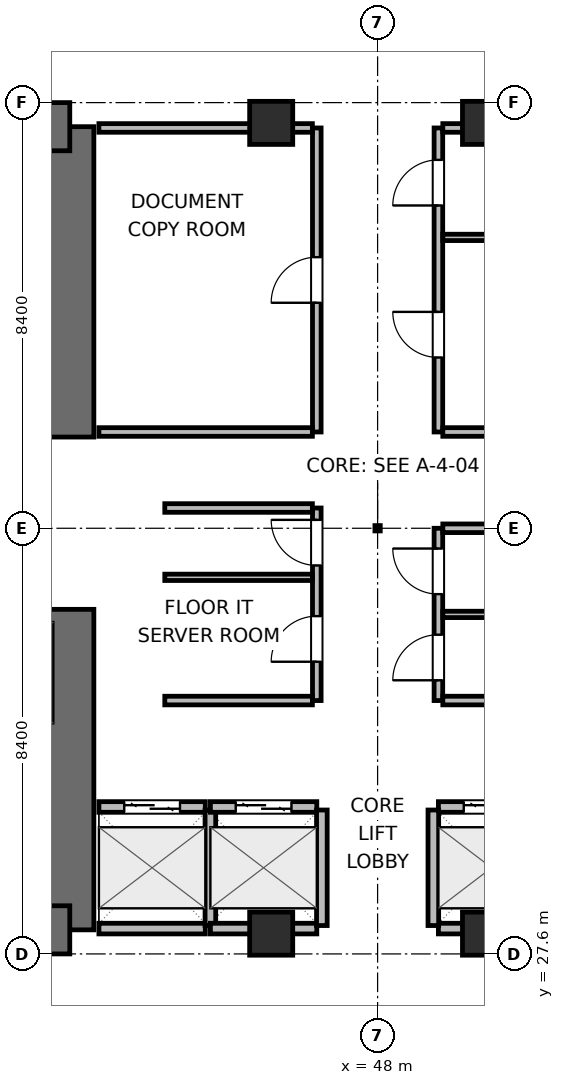
"""IFC4 building model, lengths in metres.
Left out: names, types, materials, properties, quantities, classifications, styles, units other than length and angle.
Written with IfcOpenShell. Run it as: python <this file> out.ifc"""

import sys

from ifc_helpers import new_model, si_unit, direction, frame, frame_2d, origin, origin_2d, place, context, subcontext, project, spatial, rectangle, extrude, element, fill, save


model = new_model("IFC4")
c1 = context("Model", 3, precision=1e-05, world=origin(), true_north=direction((0.0, 1.0)))
c2 = subcontext(c1, "Body", "Model", "MODEL_VIEW")
j1 = project(units=[si_unit("LENGTHUNIT", "METRE"), si_unit("PLANEANGLEUNIT", "RADIAN")], contexts=[c1])
p1 = place(None, origin())
s1 = spatial("IfcSite", under=j1, at=p1, CompositionType="ELEMENT")
p2 = place(p1, origin())
s2 = spatial("IfcBuilding", under=s1, at=p2, CompositionType="ELEMENT")
p3 = place(p2, frame((0.0, 0.0, 76.8)))
s3 = spatial("IfcBuildingStorey", under=s2, at=p3, CompositionType="ELEMENT", Elevation=76.8)
p4 = place(p3, frame((41.925, 28.075, 0.0), z_axis=(0.0, 0.0, 1.0), x_axis=(0.0, 1.0, 0.0)))
e1 = element("IfcWall", 1, at=p4, inside=s3, PredefinedType="SHEAR", context=c2, shape_type="SweptSolid", body=[
    extrude(rectangle(XDim=6.325, YDim=0.95, at=frame_2d((3.163, 0.0))), origin(), (0.0, 0.0, 1.0), 3.9),
])
p5 = place(p3, frame((41.925, 37.8, 0.0), z_axis=(0.0, 0.0, 1.0), x_axis=(0.0, 1.0, 0.0)))
e2 = element("IfcWall", 2, at=p5, inside=s3, PredefinedType="SHEAR", context=c2, shape_type="SweptSolid", body=[
    extrude(rectangle(XDim=6.125, YDim=0.95, at=frame_2d((3.062, 0.0))), origin(), (0.0, 0.0, 1.0), 3.9),
])
p6 = place(p3, frame((32.875, 28.075, 0.0), z_axis=(0.0, 0.0, 1.0), x_axis=(1.0, 0.0, 0.0)))
e3 = element("IfcWall", 3, at=p6, inside=s3, PredefinedType="SHEAR", context=c2, shape_type="SweptSolid", body=[
    extrude(rectangle(XDim=9.05, YDim=0.95, at=frame_2d((4.525, 0.0))), origin(), (0.0, 0.0, 1.0), 3.9),
])
p7 = place(p6, frame((4.975, 0.0, 0.0)))
e4 = element("IfcOpeningElement", 4, at=p7, cuts=e3, PredefinedType="OPENING", context=c2, shape_type="SweptSolid", body=[
    extrude(rectangle(XDim=1.05, YDim=2.04, at=frame_2d((0.525, 1.02))), frame((0.0, 0.485, 0.0), z_axis=(0.0, -1.0, 0.0), x_axis=(1.0, 0.0, 0.0)), (0.0, 0.0, 1.0), 0.97),
])
p8 = place(p3, frame((32.875, 43.925, 0.0), z_axis=(0.0, 0.0, 1.0), x_axis=(1.0, 0.0, 0.0)))
e5 = element("IfcWall", 5, at=p8, inside=s3, PredefinedType="SHEAR", context=c2, shape_type="SweptSolid", body=[
    extrude(rectangle(XDim=9.05, YDim=0.95, at=frame_2d((4.525, 0.0))), origin(), (0.0, 0.0, 1.0), 3.9),
])
p9 = place(p8, frame((0.975, 0.0, 0.0)))
e6 = element("IfcOpeningElement", 6, at=p9, cuts=e5, PredefinedType="OPENING", context=c2, shape_type="SweptSolid", body=[
    extrude(rectangle(XDim=0.95, YDim=2.04, at=frame_2d((0.475, 1.02))), frame((0.0, 0.485, 0.0), z_axis=(0.0, -1.0, 0.0), x_axis=(1.0, 0.0, 0.0)), (0.0, 0.0, 1.0), 0.97),
])
p10 = place(p8, frame((4.225, 0.0, 0.0)))
e7 = element("IfcOpeningElement", 7, at=p10, cuts=e5, PredefinedType="OPENING", context=c2, shape_type="SweptSolid", body=[
    extrude(rectangle(XDim=0.9, YDim=2.02, at=frame_2d((0.45, 1.01))), frame((0.0, 0.485, 0.0), z_axis=(0.0, -1.0, 0.0), x_axis=(1.0, 0.0, 0.0)), (0.0, 0.0, 1.0), 0.97),
])
p11 = place(p8, frame((7.125, 0.0, 0.0)))
e8 = element("IfcOpeningElement", 8, at=p11, cuts=e5, PredefinedType="OPENING", context=c2, shape_type="SweptSolid", body=[
    extrude(rectangle(XDim=0.9, YDim=2.02, at=frame_2d((0.45, 1.01))), frame((0.0, 0.485, 0.0), z_axis=(0.0, -1.0, 0.0), x_axis=(1.0, 0.0, 0.0)), (0.0, 0.0, 1.0), 0.97),
])
for number, where, z_axis, x_axis in (
    (9, (45.9, 28.0, 0.0), (0.0, 0.0, 1.0), (1.0, 0.0, 0.0)),
    (10, (50.1, 28.0, 0.0), (0.0, 0.0, 1.0), (1.0, 0.0, 0.0)),
    (11, (45.9, 44.0, 0.0), (0.0, 0.0, 1.0), (1.0, 0.0, 0.0)),
    (12, (50.1, 44.0, 0.0), (0.0, 0.0, 1.0), (1.0, 0.0, 0.0)),
):
    element("IfcColumn", number, at=place(p3, frame(where, z_axis=z_axis, x_axis=x_axis)), inside=s3, PredefinedType="COLUMN", context=c2, shape_type="SweptSolid", body=[
        extrude(rectangle(XDim=0.85, YDim=0.85, at=origin_2d()), origin(), (0.0, 0.0, 1.0), 3.9),
    ])
p12 = place(p3, frame((42.5, 30.5, 0.0), z_axis=(0.0, 0.0, 1.0), x_axis=(1.0, 0.0, 0.0)))
e13 = element("IfcWall", 13, at=p12, inside=s3, PredefinedType="PARTITIONING", context=c2, shape_type="SweptSolid", body=[
    extrude(rectangle(XDim=2.1, YDim=0.21, at=frame_2d((1.05, 0.0))), origin(), (0.0, 0.0, 1.0), 3.6),
])
p13 = place(p12, frame((0.5, 0.0, 0.0)))
e14 = element("IfcOpeningElement", 14, at=p13, cuts=e13, PredefinedType="OPENING", context=c2, shape_type="SweptSolid", body=[
    extrude(rectangle(XDim=1.1, YDim=2.04, at=frame_2d((0.55, 1.02))), frame((0.0, 0.115, 0.0), z_axis=(0.0, -1.0, 0.0), x_axis=(1.0, 0.0, 0.0)), (0.0, 0.0, 1.0), 0.23),
])
p14 = place(p3, frame((42.5, 28.1, 0.0), z_axis=(0.0, 0.0, 1.0), x_axis=(1.0, 0.0, 0.0)))
e15 = element("IfcWall", 15, at=p14, inside=s3, PredefinedType="PARTITIONING", context=c2, shape_type="SweptSolid", body=[
    extrude(rectangle(XDim=2.1, YDim=0.21, at=frame_2d((1.05, 0.0))), origin(), (0.0, 0.0, 1.0), 2.485),
])
p15 = place(p3, frame((44.7, 28.16, 0.0), z_axis=(0.0, 0.0, 1.0), x_axis=(0.0, 1.0, 0.0)))
e16 = element("IfcWall", 16, at=p15, inside=s3, PredefinedType="PARTITIONING", context=c2, shape_type="SweptSolid", body=[
    extrude(rectangle(XDim=2.28, YDim=0.21, at=frame_2d((1.14, 0.0))), origin(), (0.0, 0.0, 1.0), 3.6),
])
p16 = place(p3, frame((44.7, 30.5, 0.0), z_axis=(0.0, 0.0, 1.0), x_axis=(1.0, 0.0, 0.0)))
e17 = element("IfcWall", 17, at=p16, inside=s3, PredefinedType="PARTITIONING", context=c2, shape_type="SweptSolid", body=[
    extrude(rectangle(XDim=2.1, YDim=0.21, at=frame_2d((1.05, 0.0))), origin(), (0.0, 0.0, 1.0), 3.6),
])
p17 = place(p16, frame((0.5, 0.0, 0.0)))
e18 = element("IfcOpeningElement", 18, at=p17, cuts=e17, PredefinedType="OPENING", context=c2, shape_type="SweptSolid", body=[
    extrude(rectangle(XDim=1.1, YDim=2.04, at=frame_2d((0.55, 1.02))), frame((0.0, 0.115, 0.0), z_axis=(0.0, -1.0, 0.0), x_axis=(1.0, 0.0, 0.0)), (0.0, 0.0, 1.0), 0.23),
])
p18 = place(p3, frame((44.7, 28.1, 0.0), z_axis=(0.0, 0.0, 1.0), x_axis=(1.0, 0.0, 0.0)))
e19 = element("IfcWall", 19, at=p18, inside=s3, PredefinedType="PARTITIONING", context=c2, shape_type="SweptSolid", body=[
    extrude(rectangle(XDim=2.1, YDim=0.21, at=frame_2d((1.05, 0.0))), origin(), (0.0, 0.0, 1.0), 2.485),
])
p19 = place(p3, frame((46.9, 28.16, 0.0), z_axis=(0.0, 0.0, 1.0), x_axis=(0.0, 1.0, 0.0)))
e20 = element("IfcWall", 20, at=p19, inside=s3, PredefinedType="PARTITIONING", context=c2, shape_type="SweptSolid", body=[
    extrude(rectangle(XDim=2.28, YDim=0.21, at=frame_2d((1.14, 0.0))), origin(), (0.0, 0.0, 1.0), 3.6),
])
p20 = place(p3, frame((49.2, 30.5, 0.0), z_axis=(0.0, 0.0, 1.0), x_axis=(1.0, 0.0, 0.0)))
e21 = element("IfcWall", 21, at=p20, inside=s3, PredefinedType="PARTITIONING", context=c2, shape_type="SweptSolid", body=[
    extrude(rectangle(XDim=2.1, YDim=0.21, at=frame_2d((1.05, 0.0))), origin(), (0.0, 0.0, 1.0), 3.6),
])
p21 = place(p20, frame((0.5, 0.0, 0.0)))
e22 = element("IfcOpeningElement", 22, at=p21, cuts=e21, PredefinedType="OPENING", context=c2, shape_type="SweptSolid", body=[
    extrude(rectangle(XDim=1.1, YDim=2.04, at=frame_2d((0.55, 1.02))), frame((0.0, 0.115, 0.0), z_axis=(0.0, -1.0, 0.0), x_axis=(1.0, 0.0, 0.0)), (0.0, 0.0, 1.0), 0.23),
])
p22 = place(p3, frame((49.2, 28.1, 0.0), z_axis=(0.0, 0.0, 1.0), x_axis=(1.0, 0.0, 0.0)))
e23 = element("IfcWall", 23, at=p22, inside=s3, PredefinedType="PARTITIONING", context=c2, shape_type="SweptSolid", body=[
    extrude(rectangle(XDim=2.1, YDim=0.21, at=frame_2d((1.05, 0.0))), origin(), (0.0, 0.0, 1.0), 2.485),
])
p23 = place(p3, frame((49.1, 28.16, 0.0), z_axis=(0.0, 0.0, 1.0), x_axis=(0.0, 1.0, 0.0)))
e24 = element("IfcWall", 24, at=p23, inside=s3, PredefinedType="PARTITIONING", context=c2, shape_type="SweptSolid", body=[
    extrude(rectangle(XDim=2.28, YDim=0.21, at=frame_2d((1.14, 0.0))), origin(), (0.0, 0.0, 1.0), 3.6),
])
p24 = place(p3, frame((46.8, 32.6, 0.0), z_axis=(0.0, 0.0, 1.0), x_axis=(0.0, 1.0, 0.0)))
e25 = element("IfcWall", 25, at=p24, inside=s3, PredefinedType="PARTITIONING", context=c2, shape_type="SweptSolid", body=[
    extrude(rectangle(XDim=3.8, YDim=0.17, at=frame_2d((1.9, 0.0))), origin(), (0.0, 0.0, 1.0), 3.6),
])
p25 = place(p24, frame((0.766, 0.0, 0.0)))
e26 = element("IfcOpeningElement", 26, at=p25, cuts=e25, PredefinedType="OPENING", context=c2, shape_type="SweptSolid", body=[
    extrude(rectangle(XDim=0.9, YDim=2.02, at=frame_2d((0.45, 1.01))), frame((0.0, 0.095, 0.0), z_axis=(0.0, -1.0, 0.0), x_axis=(1.0, 0.0, 0.0)), (0.0, 0.0, 1.0), 0.19),
])
p26 = place(p24, frame((2.666, 0.0, 0.0)))
e27 = element("IfcOpeningElement", 27, at=p26, cuts=e25, PredefinedType="OPENING", context=c2, shape_type="SweptSolid", body=[
    extrude(rectangle(XDim=0.9, YDim=2.02, at=frame_2d((0.45, 1.01))), frame((0.0, 0.095, 0.0), z_axis=(0.0, -1.0, 0.0), x_axis=(1.0, 0.0, 0.0)), (0.0, 0.0, 1.0), 0.19),
])
for number, where, z_axis, x_axis in (
    (28, (43.8, 32.6, 0.0), (0.0, 0.0, 1.0), (1.0, 0.0, 0.0)),
    (29, (43.8, 36.4, 0.0), (0.0, 0.0, 1.0), (1.0, 0.0, 0.0)),
):
    element("IfcWall", number, at=place(p3, frame(where, z_axis=z_axis, x_axis=x_axis)), inside=s3, PredefinedType="PARTITIONING", context=c2, shape_type="SweptSolid", body=[
        extrude(rectangle(XDim=2.913, YDim=0.17, at=frame_2d((1.457, 0.0))), origin(), (0.0, 0.0, 1.0), 3.6),
    ])
p27 = place(p3, frame((43.8, 35.032, 0.0), z_axis=(0.0, 0.0, 1.0), x_axis=(1.0, 0.0, 0.0)))
e30 = element("IfcWall", 30, at=p27, inside=s3, PredefinedType="PARTITIONING", context=c2, shape_type="SweptSolid", body=[
    extrude(rectangle(XDim=2.913, YDim=0.125, at=frame_2d((1.457, 0.0))), origin(), (0.0, 0.0, 1.0), 3.6),
])
p28 = place(p3, frame((49.2, 32.6, 0.0), z_axis=(0.0, 0.0, 1.0), x_axis=(0.0, 1.0, 0.0)))
e31 = element("IfcWall", 31, at=p28, inside=s3, PredefinedType="PARTITIONING", context=c2, shape_type="SweptSolid", body=[
    extrude(rectangle(XDim=3.4, YDim=0.17, at=frame_2d((1.7, 0.0))), origin(), (0.0, 0.0, 1.0), 3.6),
])
p29 = place(p28, frame((0.4, 0.0, 0.0)))
e32 = element("IfcOpeningElement", 32, at=p29, cuts=e31, PredefinedType="OPENING", context=c2, shape_type="SweptSolid", body=[
    extrude(rectangle(XDim=0.9, YDim=2.02, at=frame_2d((0.45, 1.01))), frame((0.0, 0.095, 0.0), z_axis=(0.0, -1.0, 0.0), x_axis=(1.0, 0.0, 0.0)), (0.0, 0.0, 1.0), 0.19),
])
p30 = place(p28, frame((2.1, 0.0, 0.0)))
e33 = element("IfcOpeningElement", 33, at=p30, cuts=e31, PredefinedType="OPENING", context=c2, shape_type="SweptSolid", body=[
    extrude(rectangle(XDim=0.9, YDim=2.02, at=frame_2d((0.45, 1.01))), frame((0.0, 0.095, 0.0), z_axis=(0.0, -1.0, 0.0), x_axis=(1.0, 0.0, 0.0)), (0.0, 0.0, 1.0), 0.19),
])
for number, where, z_axis, x_axis in (
    (34, (49.287, 32.6, 0.0), (0.0, 0.0, 1.0), (1.0, 0.0, 0.0)),
    (35, (49.287, 36.0, 0.0), (0.0, 0.0, 1.0), (1.0, 0.0, 0.0)),
):
    element("IfcWall", number, at=place(p3, frame(where, z_axis=z_axis, x_axis=x_axis)), inside=s3, PredefinedType="PARTITIONING", context=c2, shape_type="SweptSolid", body=[
        extrude(rectangle(XDim=2.913, YDim=0.17, at=frame_2d((1.457, 0.0))), origin(), (0.0, 0.0, 1.0), 3.6),
    ])
p31 = place(p3, frame((49.287, 34.3, 0.0), z_axis=(0.0, 0.0, 1.0), x_axis=(1.0, 0.0, 0.0)))
e36 = element("IfcWall", 36, at=p31, inside=s3, PredefinedType="PARTITIONING", context=c2, shape_type="SweptSolid", body=[
    extrude(rectangle(XDim=2.913, YDim=0.125, at=frame_2d((1.457, 0.0))), origin(), (0.0, 0.0, 1.0), 3.6),
])
p32 = place(p3, frame((46.8, 37.9, 0.0), z_axis=(0.0, 0.0, 1.0), x_axis=(0.0, 1.0, 0.0)))
e37 = element("IfcWall", 37, at=p32, inside=s3, PredefinedType="PARTITIONING", context=c2, shape_type="SweptSolid", body=[
    extrude(rectangle(XDim=6.0, YDim=0.17, at=frame_2d((3.0, 0.0))), origin(), (0.0, 0.0, 1.0), 3.6),
])
p33 = place(p32, frame((2.55, 0.0, 0.0)))
e38 = element("IfcOpeningElement", 38, at=p33, cuts=e37, PredefinedType="OPENING", context=c2, shape_type="SweptSolid", body=[
    extrude(rectangle(XDim=0.9, YDim=2.02, at=frame_2d((0.45, 1.01))), frame((0.0, 0.095, 0.0), z_axis=(0.0, -1.0, 0.0), x_axis=(1.0, 0.0, 0.0)), (0.0, 0.0, 1.0), 0.19),
])
p34 = place(p3, frame((42.5, 37.9, 0.0), z_axis=(0.0, 0.0, 1.0), x_axis=(1.0, 0.0, 0.0)))
e39 = element("IfcWall", 39, at=p34, inside=s3, PredefinedType="PARTITIONING", context=c2, shape_type="SweptSolid", body=[
    extrude(rectangle(XDim=4.213, YDim=0.17, at=frame_2d((2.106, 0.0))), origin(), (0.0, 0.0, 1.0), 3.6),
])
p35 = place(p3, frame((42.5, 43.9, 0.0), z_axis=(0.0, 0.0, 1.0), x_axis=(1.0, 0.0, 0.0)))
e40 = element("IfcWall", 40, at=p35, inside=s3, PredefinedType="PARTITIONING", context=c2, shape_type="SweptSolid", body=[
    extrude(rectangle(XDim=4.213, YDim=0.17, at=frame_2d((2.106, 0.0))), origin(), (0.0, 0.0, 1.0), 2.485),
])
p36 = place(p3, frame((49.2, 37.9, 0.0), z_axis=(0.0, 0.0, 1.0), x_axis=(0.0, 1.0, 0.0)))
e41 = element("IfcWall", 41, at=p36, inside=s3, PredefinedType="PARTITIONING", context=c2, shape_type="SweptSolid", body=[
    extrude(rectangle(XDim=6.0, YDim=0.17, at=frame_2d((3.0, 0.0))), origin(), (0.0, 0.0, 1.0), 3.6),
])
p37 = place(p36, frame((1.47, 0.0, 0.0)))
e42 = element("IfcOpeningElement", 42, at=p37, cuts=e41, PredefinedType="OPENING", context=c2, shape_type="SweptSolid", body=[
    extrude(rectangle(XDim=0.9, YDim=2.02, at=frame_2d((0.45, 1.01))), frame((0.0, 0.095, 0.0), z_axis=(0.0, -1.0, 0.0), x_axis=(1.0, 0.0, 0.0)), (0.0, 0.0, 1.0), 0.19),
])
p38 = place(p36, frame((4.47, 0.0, 0.0)))
e43 = element("IfcOpeningElement", 43, at=p38, cuts=e41, PredefinedType="OPENING", context=c2, shape_type="SweptSolid", body=[
    extrude(rectangle(XDim=0.9, YDim=2.02, at=frame_2d((0.45, 1.01))), frame((0.0, 0.095, 0.0), z_axis=(0.0, -1.0, 0.0), x_axis=(1.0, 0.0, 0.0)), (0.0, 0.0, 1.0), 0.19),
])
p39 = place(p3, frame((49.287, 37.9, 0.0), z_axis=(0.0, 0.0, 1.0), x_axis=(1.0, 0.0, 0.0)))
e44 = element("IfcWall", 44, at=p39, inside=s3, PredefinedType="PARTITIONING", context=c2, shape_type="SweptSolid", body=[
    extrude(rectangle(XDim=4.113, YDim=0.17, at=frame_2d((2.056, 0.0))), origin(), (0.0, 0.0, 1.0), 3.6),
])
p40 = place(p3, frame((49.287, 43.9, 0.0), z_axis=(0.0, 0.0, 1.0), x_axis=(1.0, 0.0, 0.0)))
e45 = element("IfcWall", 45, at=p40, inside=s3, PredefinedType="PARTITIONING", context=c2, shape_type="SweptSolid", body=[
    extrude(rectangle(XDim=4.113, YDim=0.17, at=frame_2d((2.056, 0.0))), origin(), (0.0, 0.0, 1.0), 2.485),
])
p41 = place(p3, frame((49.287, 41.74, 0.0), z_axis=(0.0, 0.0, 1.0), x_axis=(1.0, 0.0, 0.0)))
e46 = element("IfcWall", 46, at=p41, inside=s3, PredefinedType="PARTITIONING", context=c2, shape_type="SweptSolid", body=[
    extrude(rectangle(XDim=4.113, YDim=0.125, at=frame_2d((2.056, 0.0))), origin(), (0.0, 0.0, 1.0), 3.6),
])
p42 = place(p13, origin())
e47 = element("IfcDoor", 47, at=p42, inside=s3, OperationType="DOUBLE_DOOR_SLIDING", PredefinedType="DOOR", context=c2, shape_type="SweptSolid", body=[
    extrude(rectangle(XDim=1.1, YDim=2.04, at=frame_2d((0.55, 1.02))), frame((0.0, 0.025, 0.0), z_axis=(0.0, -1.0, 0.0), x_axis=(1.0, 0.0, 0.0)), (0.0, 0.0, 1.0), 0.05),
])
fill(e14, e47)
p43 = place(p17, origin())
e48 = element("IfcDoor", 48, at=p43, inside=s3, OperationType="DOUBLE_DOOR_SLIDING", PredefinedType="DOOR", context=c2, shape_type="SweptSolid", body=[
    extrude(rectangle(XDim=1.1, YDim=2.04, at=frame_2d((0.55, 1.02))), frame((0.0, 0.025, 0.0), z_axis=(0.0, -1.0, 0.0), x_axis=(1.0, 0.0, 0.0)), (0.0, 0.0, 1.0), 0.05),
])
fill(e18, e48)
p44 = place(p21, origin())
e49 = element("IfcDoor", 49, at=p44, inside=s3, OperationType="DOUBLE_DOOR_SLIDING", PredefinedType="DOOR", context=c2, shape_type="SweptSolid", body=[
    extrude(rectangle(XDim=1.1, YDim=2.04, at=frame_2d((0.55, 1.02))), frame((0.0, 0.025, 0.0), z_axis=(0.0, -1.0, 0.0), x_axis=(1.0, 0.0, 0.0)), (0.0, 0.0, 1.0), 0.05),
])
fill(e22, e49)
p45 = place(p25, origin())
e50 = element("IfcDoor", 50, at=p45, inside=s3, OperationType="SINGLE_SWING_LEFT", PredefinedType="DOOR", context=c2, shape_type="SweptSolid", body=[
    extrude(rectangle(XDim=0.9, YDim=2.02, at=frame_2d((0.45, 1.01))), frame((0.0, 0.025, 0.0), z_axis=(0.0, -1.0, 0.0), x_axis=(1.0, 0.0, 0.0)), (0.0, 0.0, 1.0), 0.05),
])
fill(e26, e50)
p46 = place(p26, origin())
e51 = element("IfcDoor", 51, at=p46, inside=s3, OperationType="SINGLE_SWING_RIGHT", PredefinedType="DOOR", context=c2, shape_type="SweptSolid", body=[
    extrude(rectangle(XDim=0.9, YDim=2.02, at=frame_2d((0.45, 1.01))), frame((0.0, 0.025, 0.0), z_axis=(0.0, -1.0, 0.0), x_axis=(1.0, 0.0, 0.0)), (0.0, 0.0, 1.0), 0.05),
])
fill(e27, e51)
p47 = place(p29, origin())
e52 = element("IfcDoor", 52, at=p47, inside=s3, OperationType="SINGLE_SWING_LEFT", PredefinedType="DOOR", context=c2, shape_type="SweptSolid", body=[
    extrude(rectangle(XDim=0.9, YDim=2.02, at=frame_2d((0.45, 1.01))), frame((0.0, 0.025, 0.0), z_axis=(0.0, -1.0, 0.0), x_axis=(1.0, 0.0, 0.0)), (0.0, 0.0, 1.0), 0.05),
])
fill(e32, e52)
p48 = place(p30, origin())
e53 = element("IfcDoor", 53, at=p48, inside=s3, OperationType="SINGLE_SWING_RIGHT", PredefinedType="DOOR", context=c2, shape_type="SweptSolid", body=[
    extrude(rectangle(XDim=0.9, YDim=2.02, at=frame_2d((0.45, 1.01))), frame((0.0, 0.025, 0.0), z_axis=(0.0, -1.0, 0.0), x_axis=(1.0, 0.0, 0.0)), (0.0, 0.0, 1.0), 0.05),
])
fill(e33, e53)
p49 = place(p33, origin())
e54 = element("IfcDoor", 54, at=p49, inside=s3, OperationType="SINGLE_SWING_LEFT", PredefinedType="DOOR", context=c2, shape_type="SweptSolid", body=[
    extrude(rectangle(XDim=0.9, YDim=2.02, at=frame_2d((0.45, 1.01))), frame((0.0, 0.025, 0.0), z_axis=(0.0, -1.0, 0.0), x_axis=(1.0, 0.0, 0.0)), (0.0, 0.0, 1.0), 0.05),
])
fill(e38, e54)
p50 = place(p37, origin())
e55 = element("IfcDoor", 55, at=p50, inside=s3, OperationType="SINGLE_SWING_RIGHT", PredefinedType="DOOR", context=c2, shape_type="SweptSolid", body=[
    extrude(rectangle(XDim=0.9, YDim=2.02, at=frame_2d((0.45, 1.01))), frame((0.0, 0.025, 0.0), z_axis=(0.0, -1.0, 0.0), x_axis=(1.0, 0.0, 0.0)), (0.0, 0.0, 1.0), 0.05),
])
fill(e42, e55)
p51 = place(p38, origin())
e56 = element("IfcDoor", 56, at=p51, inside=s3, OperationType="SINGLE_SWING_LEFT", PredefinedType="DOOR", context=c2, shape_type="SweptSolid", body=[
    extrude(rectangle(XDim=0.9, YDim=2.02, at=frame_2d((0.45, 1.01))), frame((0.0, 0.025, 0.0), z_axis=(0.0, -1.0, 0.0), x_axis=(1.0, 0.0, 0.0)), (0.0, 0.0, 1.0), 0.05),
])
fill(e43, e56)
save(model, sys.argv[1])
